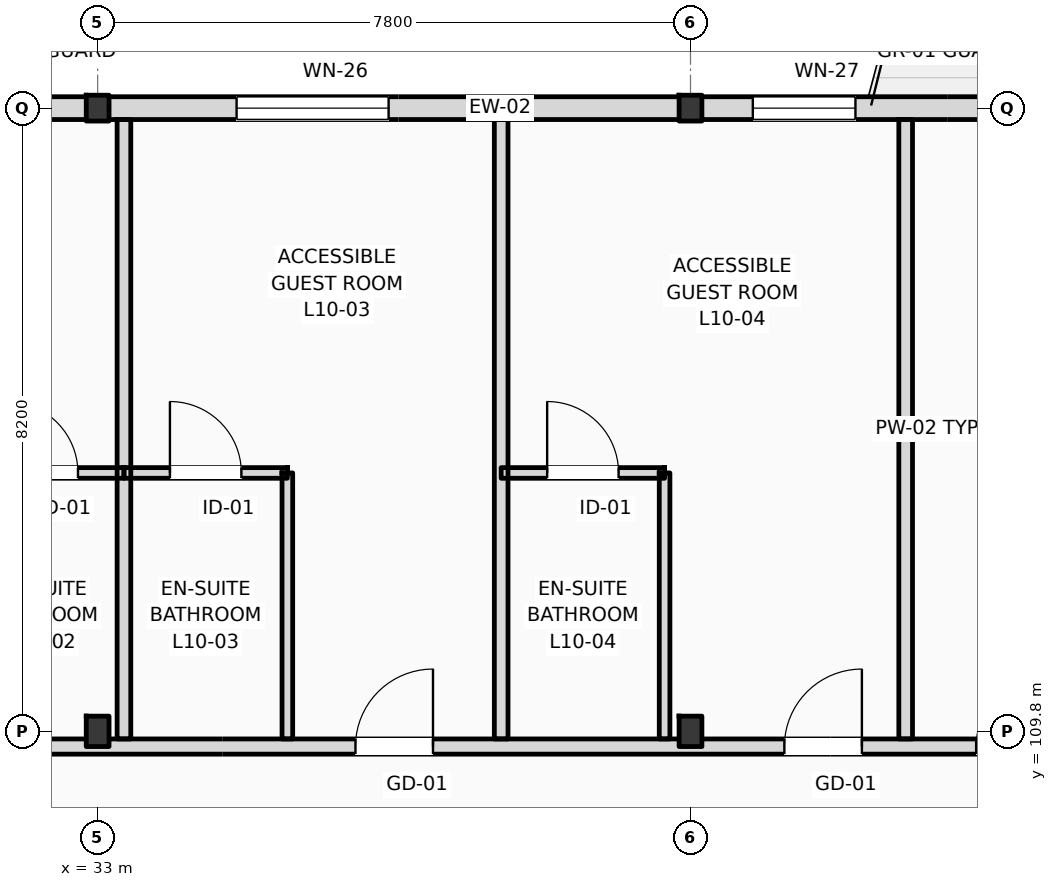
"""IFC4 building model, lengths in metres.
Left out: names, types, materials, properties, quantities, classifications, styles, units other than length and angle.
Written with IfcOpenShell. Run it as: python <this file> out.ifc"""

import sys

from ifc_helpers import new_model, si_unit, direction, frame, frame_2d, origin, origin_2d, place, context, subcontext, project, spatial, rectangle, i_section, extrude, element, fill, save


model = new_model("IFC4")
c1 = context("Model", 3, precision=1e-05, world=origin(), true_north=direction((0.0, 1.0)))
c2 = subcontext(c1, "Body", "Model", "MODEL_VIEW")
j1 = project(units=[si_unit("LENGTHUNIT", "METRE"), si_unit("PLANEANGLEUNIT", "RADIAN")], contexts=[c1])
p1 = place(None, origin())
s1 = spatial("IfcSite", under=j1, at=p1, CompositionType="ELEMENT")
p2 = place(p1, origin())
s2 = spatial("IfcBuilding", under=s1, at=p2, CompositionType="ELEMENT")
p3 = place(p2, frame((0.0, 0.0, 42.6)))
s3 = spatial("IfcBuildingStorey", under=s2, at=p3, CompositionType="ELEMENT", Elevation=42.6)
p4 = place(p3, frame((33.0, 109.8, 0.0), z_axis=(0.0, 0.0, 1.0), x_axis=(1.0, 0.0, 0.0)))
e1 = element("IfcColumn", 1, at=p4, inside=s3, PredefinedType="COLUMN", context=c2, shape_type="SweptSolid", body=[
    extrude(i_section(OverallWidth=0.3, OverallDepth=0.4, WebThickness=0.013, FlangeThickness=0.024, FilletRadius=0.027, at=origin_2d()), origin(), (0.0, 0.0, 1.0), 4.2),
])
p5 = place(p3, frame((33.0, 118.0, 0.0), z_axis=(0.0, 0.0, 1.0), x_axis=(1.0, 0.0, 0.0)))
e2 = element("IfcColumn", 2, at=p5, inside=s3, PredefinedType="COLUMN", context=c2, shape_type="SweptSolid", body=[
    extrude(i_section(OverallWidth=0.3, OverallDepth=0.34, WebThickness=0.012, FlangeThickness=0.021, FilletRadius=0.027, at=origin_2d()), origin(), (0.0, 0.0, 1.0), 4.2),
])
p6 = place(p3, frame((40.8, 109.8, 0.0), z_axis=(0.0, 0.0, 1.0), x_axis=(1.0, 0.0, 0.0)))
e3 = element("IfcColumn", 3, at=p6, inside=s3, PredefinedType="COLUMN", context=c2, shape_type="SweptSolid", body=[
    extrude(i_section(OverallWidth=0.3, OverallDepth=0.4, WebThickness=0.013, FlangeThickness=0.024, FilletRadius=0.027, at=origin_2d()), origin(), (0.0, 0.0, 1.0), 4.2),
])
p7 = place(p3, frame((40.8, 118.0, 0.0), z_axis=(0.0, 0.0, 1.0), x_axis=(1.0, 0.0, 0.0)))
e4 = element("IfcColumn", 4, at=p7, inside=s3, PredefinedType="COLUMN", context=c2, shape_type="SweptSolid", body=[
    extrude(i_section(OverallWidth=0.3, OverallDepth=0.34, WebThickness=0.012, FlangeThickness=0.021, FilletRadius=0.027, at=origin_2d()), origin(), (0.0, 0.0, 1.0), 4.2),
])
p8 = place(p3, frame((22.5, 118.0, 0.0), z_axis=(0.0, 0.0, 1.0), x_axis=(1.0, 0.0, 0.0)))
e5 = element("IfcWall", 5, at=p8, inside=s3, PredefinedType="STANDARD", context=c2, shape_type="SweptSolid", body=[
    extrude(rectangle(XDim=72.9, YDim=0.3, at=frame_2d((36.45, 0.0))), origin(), (0.0, 0.0, 1.0), 3.42),
])
p9 = place(p8, frame((3.611, 0.0, 0.9)))
e6 = element("IfcOpeningElement", 6, at=p9, cuts=e5, PredefinedType="OPENING", context=c2, shape_type="SweptSolid", body=[
    extrude(rectangle(XDim=1.35, YDim=1.75, at=frame_2d((0.675, 0.875))), frame((0.0, 0.16, 0.0), z_axis=(0.0, -1.0, 0.0), x_axis=(1.0, 0.0, 0.0)), (0.0, 0.0, 1.0), 0.32),
])
p10 = place(p8, frame((7.091, 0.0, 0.0)))
e7 = element("IfcOpeningElement", 7, at=p10, cuts=e5, PredefinedType="OPENING", context=c2, shape_type="SweptSolid", body=[
    extrude(rectangle(XDim=1.2, YDim=2.25, at=frame_2d((0.6, 1.125))), frame((0.0, 0.16, 0.0), z_axis=(0.0, -1.0, 0.0), x_axis=(1.0, 0.0, 0.0)), (0.0, 0.0, 1.0), 0.32),
])
p11 = place(p8, frame((12.328, 0.0, 0.9)))
e8 = element("IfcOpeningElement", 8, at=p11, cuts=e5, PredefinedType="OPENING", context=c2, shape_type="SweptSolid", body=[
    extrude(rectangle(XDim=2.0, YDim=2.34, at=frame_2d((1.0, 1.17))), frame((0.0, 0.16, 0.0), z_axis=(0.0, -1.0, 0.0), x_axis=(1.0, 0.0, 0.0)), (0.0, 0.0, 1.0), 0.32),
])
p12 = place(p8, frame((19.12, 0.0, 0.9)))
e9 = element("IfcOpeningElement", 9, at=p12, cuts=e5, PredefinedType="OPENING", context=c2, shape_type="SweptSolid", body=[
    extrude(rectangle(XDim=1.35, YDim=2.34, at=frame_2d((0.675, 1.17))), frame((0.0, 0.16, 0.0), z_axis=(0.0, -1.0, 0.0), x_axis=(1.0, 0.0, 0.0)), (0.0, 0.0, 1.0), 0.32),
])
p13 = place(p8, frame((22.696, 0.0, 0.0)))
e10 = element("IfcOpeningElement", 10, at=p13, cuts=e5, PredefinedType="OPENING", context=c2, shape_type="SweptSolid", body=[
    extrude(rectangle(XDim=1.2, YDim=2.25, at=frame_2d((0.6, 1.125))), frame((0.0, 0.16, 0.0), z_axis=(0.0, -1.0, 0.0), x_axis=(1.0, 0.0, 0.0)), (0.0, 0.0, 1.0), 0.32),
])
p14 = place(p8, frame((27.205, 0.0, 0.9)))
e11 = element("IfcOpeningElement", 11, at=p14, cuts=e5, PredefinedType="OPENING", context=c2, shape_type="SweptSolid", body=[
    extrude(rectangle(XDim=3.1, YDim=2.34, at=frame_2d((1.55, 1.17))), frame((0.0, 0.16, 0.0), z_axis=(0.0, -1.0, 0.0), x_axis=(1.0, 0.0, 0.0)), (0.0, 0.0, 1.0), 0.32),
])
p15 = place(p8, frame((31.948, 0.0, 0.9)))
e12 = element("IfcOpeningElement", 12, at=p15, cuts=e5, PredefinedType="OPENING", context=c2, shape_type="SweptSolid", body=[
    extrude(rectangle(XDim=1.1, YDim=2.34, at=frame_2d((0.55, 1.17))), frame((0.0, 0.16, 0.0), z_axis=(0.0, -1.0, 0.0), x_axis=(1.0, 0.0, 0.0)), (0.0, 0.0, 1.0), 0.32),
])
p16 = place(p8, frame((38.12, 0.0, 0.0)))
e13 = element("IfcOpeningElement", 13, at=p16, cuts=e5, PredefinedType="OPENING", context=c2, shape_type="SweptSolid", body=[
    extrude(rectangle(XDim=1.2, YDim=2.25, at=frame_2d((0.6, 1.125))), frame((0.0, 0.16, 0.0), z_axis=(0.0, -1.0, 0.0), x_axis=(1.0, 0.0, 0.0)), (0.0, 0.0, 1.0), 0.32),
])
p17 = place(p8, frame((43.51, 0.0, 0.9)))
e14 = element("IfcOpeningElement", 14, at=p17, cuts=e5, PredefinedType="OPENING", context=c2, shape_type="SweptSolid", body=[
    extrude(rectangle(XDim=1.35, YDim=1.85, at=frame_2d((0.675, 0.925))), frame((0.0, 0.16, 0.0), z_axis=(0.0, -1.0, 0.0), x_axis=(1.0, 0.0, 0.0)), (0.0, 0.0, 1.0), 0.32),
])
p18 = place(p8, frame((47.178, 0.0, 0.9)))
e15 = element("IfcOpeningElement", 15, at=p18, cuts=e5, PredefinedType="OPENING", context=c2, shape_type="SweptSolid", body=[
    extrude(rectangle(XDim=1.5, YDim=1.9, at=frame_2d((0.75, 0.95))), frame((0.0, 0.16, 0.0), z_axis=(0.0, -1.0, 0.0), x_axis=(1.0, 0.0, 0.0)), (0.0, 0.0, 1.0), 0.32),
])
p19 = place(p8, frame((53.724, 0.0, 0.0)))
e16 = element("IfcOpeningElement", 16, at=p19, cuts=e5, PredefinedType="OPENING", context=c2, shape_type="SweptSolid", body=[
    extrude(rectangle(XDim=1.2, YDim=2.25, at=frame_2d((0.6, 1.125))), frame((0.0, 0.16, 0.0), z_axis=(0.0, -1.0, 0.0), x_axis=(1.0, 0.0, 0.0)), (0.0, 0.0, 1.0), 0.32),
])
p20 = place(p8, frame((58.712, 0.0, 0.9)))
e17 = element("IfcOpeningElement", 17, at=p20, cuts=e5, PredefinedType="OPENING", context=c2, shape_type="SweptSolid", body=[
    extrude(rectangle(XDim=1.8, YDim=2.0, at=frame_2d((0.9, 1.0))), frame((0.0, 0.16, 0.0), z_axis=(0.0, -1.0, 0.0), x_axis=(1.0, 0.0, 0.0)), (0.0, 0.0, 1.0), 0.32),
])
p21 = place(p8, frame((62.781, 0.0, 0.9)))
e18 = element("IfcOpeningElement", 18, at=p21, cuts=e5, PredefinedType="OPENING", context=c2, shape_type="SweptSolid", body=[
    extrude(rectangle(XDim=1.35, YDim=2.05, at=frame_2d((0.675, 1.025))), frame((0.0, 0.16, 0.0), z_axis=(0.0, -1.0, 0.0), x_axis=(1.0, 0.0, 0.0)), (0.0, 0.0, 1.0), 0.32),
])
p22 = place(p8, frame((68.819, 0.0, 0.9)))
e19 = element("IfcOpeningElement", 19, at=p22, cuts=e5, PredefinedType="OPENING", context=c2, shape_type="SweptSolid", body=[
    extrude(rectangle(XDim=2.1, YDim=2.1, at=frame_2d((1.05, 1.05))), frame((0.0, 0.16, 0.0), z_axis=(0.0, -1.0, 0.0), x_axis=(1.0, 0.0, 0.0)), (0.0, 0.0, 1.0), 0.32),
])
p23 = place(p3, frame((10.65, 109.6, 0.0), z_axis=(0.0, 0.0, 1.0), x_axis=(1.0, 0.0, 0.0)))
e20 = element("IfcWall", 20, at=p23, inside=s3, PredefinedType="PARTITIONING", context=c2, shape_type="SweptSolid", body=[
    extrude(rectangle(XDim=84.61, YDim=0.2, at=frame_2d((42.305, 0.0))), origin(), (0.0, 0.0, 1.0), 3.38),
])
p24 = place(p23, frame((15.926, 0.0, 0.0)))
e21 = element("IfcOpeningElement", 21, at=p24, cuts=e20, PredefinedType="OPENING", context=c2, shape_type="SweptSolid", body=[
    extrude(rectangle(XDim=1.02, YDim=2.2, at=frame_2d((0.51, 1.1))), frame((0.0, 0.11, 0.0), z_axis=(0.0, -1.0, 0.0), x_axis=(1.0, 0.0, 0.0)), (0.0, 0.0, 1.0), 0.22),
])
p25 = place(p23, frame((18.45, 0.0, 0.0)))
e22 = element("IfcOpeningElement", 22, at=p25, cuts=e20, PredefinedType="OPENING", context=c2, shape_type="SweptSolid", body=[
    extrude(rectangle(XDim=1.02, YDim=2.2, at=frame_2d((0.51, 1.1))), frame((0.0, 0.11, 0.0), z_axis=(0.0, -1.0, 0.0), x_axis=(1.0, 0.0, 0.0)), (0.0, 0.0, 1.0), 0.22),
])
p26 = place(p23, frame((25.742, 0.0, 0.0)))
e23 = element("IfcOpeningElement", 23, at=p26, cuts=e20, PredefinedType="OPENING", context=c2, shape_type="SweptSolid", body=[
    extrude(rectangle(XDim=1.02, YDim=2.2, at=frame_2d((0.51, 1.1))), frame((0.0, 0.11, 0.0), z_axis=(0.0, -1.0, 0.0), x_axis=(1.0, 0.0, 0.0)), (0.0, 0.0, 1.0), 0.22),
])
p27 = place(p23, frame((31.385, 0.0, 0.0)))
e24 = element("IfcOpeningElement", 24, at=p27, cuts=e20, PredefinedType="OPENING", context=c2, shape_type="SweptSolid", body=[
    extrude(rectangle(XDim=1.02, YDim=2.2, at=frame_2d((0.51, 1.1))), frame((0.0, 0.11, 0.0), z_axis=(0.0, -1.0, 0.0), x_axis=(1.0, 0.0, 0.0)), (0.0, 0.0, 1.0), 0.22),
])
p28 = place(p23, frame((33.908, 0.0, 0.0)))
e25 = element("IfcOpeningElement", 25, at=p28, cuts=e20, PredefinedType="OPENING", context=c2, shape_type="SweptSolid", body=[
    extrude(rectangle(XDim=0.96, YDim=2.2, at=frame_2d((0.48, 1.1))), frame((0.0, 0.11, 0.0), z_axis=(0.0, -1.0, 0.0), x_axis=(1.0, 0.0, 0.0)), (0.0, 0.0, 1.0), 0.22),
])
p29 = place(p23, frame((41.201, 0.0, 0.0)))
e26 = element("IfcOpeningElement", 26, at=p29, cuts=e20, PredefinedType="OPENING", context=c2, shape_type="SweptSolid", body=[
    extrude(rectangle(XDim=0.96, YDim=2.2, at=frame_2d((0.48, 1.1))), frame((0.0, 0.11, 0.0), z_axis=(0.0, -1.0, 0.0), x_axis=(1.0, 0.0, 0.0)), (0.0, 0.0, 1.0), 0.22),
])
p30 = place(p23, frame((46.844, 0.0, 0.0)))
e27 = element("IfcOpeningElement", 27, at=p30, cuts=e20, PredefinedType="OPENING", context=c2, shape_type="SweptSolid", body=[
    extrude(rectangle(XDim=0.96, YDim=2.2, at=frame_2d((0.48, 1.1))), frame((0.0, 0.11, 0.0), z_axis=(0.0, -1.0, 0.0), x_axis=(1.0, 0.0, 0.0)), (0.0, 0.0, 1.0), 0.22),
])
p31 = place(p23, frame((49.337, 0.0, 0.0)))
e28 = element("IfcOpeningElement", 28, at=p31, cuts=e20, PredefinedType="OPENING", context=c2, shape_type="SweptSolid", body=[
    extrude(rectangle(XDim=0.96, YDim=2.2, at=frame_2d((0.48, 1.1))), frame((0.0, 0.11, 0.0), z_axis=(0.0, -1.0, 0.0), x_axis=(1.0, 0.0, 0.0)), (0.0, 0.0, 1.0), 0.22),
])
p32 = place(p23, frame((56.63, 0.0, 0.0)))
e29 = element("IfcOpeningElement", 29, at=p32, cuts=e20, PredefinedType="OPENING", context=c2, shape_type="SweptSolid", body=[
    extrude(rectangle(XDim=0.96, YDim=2.2, at=frame_2d((0.48, 1.1))), frame((0.0, 0.11, 0.0), z_axis=(0.0, -1.0, 0.0), x_axis=(1.0, 0.0, 0.0)), (0.0, 0.0, 1.0), 0.22),
])
p33 = place(p23, frame((62.523, 0.0, 0.0)))
e30 = element("IfcOpeningElement", 30, at=p33, cuts=e20, PredefinedType="OPENING", context=c2, shape_type="SweptSolid", body=[
    extrude(rectangle(XDim=0.96, YDim=2.2, at=frame_2d((0.48, 1.1))), frame((0.0, 0.11, 0.0), z_axis=(0.0, -1.0, 0.0), x_axis=(1.0, 0.0, 0.0)), (0.0, 0.0, 1.0), 0.22),
])
p34 = place(p23, frame((64.765, 0.0, 0.0)))
e31 = element("IfcOpeningElement", 31, at=p34, cuts=e20, PredefinedType="OPENING", context=c2, shape_type="SweptSolid", body=[
    extrude(rectangle(XDim=0.96, YDim=2.2, at=frame_2d((0.48, 1.1))), frame((0.0, 0.11, 0.0), z_axis=(0.0, -1.0, 0.0), x_axis=(1.0, 0.0, 0.0)), (0.0, 0.0, 1.0), 0.22),
])
p35 = place(p23, frame((72.057, 0.0, 0.0)))
e32 = element("IfcOpeningElement", 32, at=p35, cuts=e20, PredefinedType="OPENING", context=c2, shape_type="SweptSolid", body=[
    extrude(rectangle(XDim=0.96, YDim=2.2, at=frame_2d((0.48, 1.1))), frame((0.0, 0.11, 0.0), z_axis=(0.0, -1.0, 0.0), x_axis=(1.0, 0.0, 0.0)), (0.0, 0.0, 1.0), 0.22),
])
p36 = place(p23, frame((74.55, 0.0, 0.0)))
e33 = element("IfcOpeningElement", 33, at=p36, cuts=e20, PredefinedType="OPENING", context=c2, shape_type="SweptSolid", body=[
    extrude(rectangle(XDim=0.96, YDim=2.2, at=frame_2d((0.48, 1.1))), frame((0.0, 0.11, 0.0), z_axis=(0.0, -1.0, 0.0), x_axis=(1.0, 0.0, 0.0)), (0.0, 0.0, 1.0), 0.22),
])
p37 = place(p23, frame((80.163, 0.0, 0.0)))
e34 = element("IfcOpeningElement", 34, at=p37, cuts=e20, PredefinedType="OPENING", context=c2, shape_type="SweptSolid", body=[
    extrude(rectangle(XDim=0.96, YDim=2.2, at=frame_2d((0.48, 1.1))), frame((0.0, 0.11, 0.0), z_axis=(0.0, -1.0, 0.0), x_axis=(1.0, 0.0, 0.0)), (0.0, 0.0, 1.0), 0.22),
])
p38 = place(p23, frame((2.716, 0.0, 0.0)))
e35 = element("IfcOpeningElement", 35, at=p38, cuts=e20, PredefinedType="OPENING", context=c2, shape_type="SweptSolid", body=[
    extrude(rectangle(XDim=1.35, YDim=2.25, at=frame_2d((0.675, 1.125))), frame((0.0, 0.11, 0.0), z_axis=(0.0, -1.0, 0.0), x_axis=(1.0, 0.0, 0.0)), (0.0, 0.0, 1.0), 0.22),
])
p39 = place(p23, frame((6.65, 0.0, 0.0)))
e36 = element("IfcOpeningElement", 36, at=p39, cuts=e20, PredefinedType="OPENING", context=c2, shape_type="SweptSolid", body=[
    extrude(rectangle(XDim=1.35, YDim=2.25, at=frame_2d((0.675, 1.125))), frame((0.0, 0.11, 0.0), z_axis=(0.0, -1.0, 0.0), x_axis=(1.0, 0.0, 0.0)), (0.0, 0.0, 1.0), 0.22),
])
p40 = place(p23, frame((10.583, 0.0, 0.0)))
e37 = element("IfcOpeningElement", 37, at=p40, cuts=e20, PredefinedType="OPENING", context=c2, shape_type="SweptSolid", body=[
    extrude(rectangle(XDim=1.35, YDim=2.25, at=frame_2d((0.675, 1.125))), frame((0.0, 0.11, 0.0), z_axis=(0.0, -1.0, 0.0), x_axis=(1.0, 0.0, 0.0)), (0.0, 0.0, 1.0), 0.22),
])
p41 = place(p3, frame((33.346, 109.7, 0.0), z_axis=(0.0, 0.0, 1.0), x_axis=(0.0, 1.0, 0.0)))
e38 = element("IfcWall", 38, at=p41, inside=s3, PredefinedType="PARTITIONING", context=c2, shape_type="SweptSolid", body=[
    extrude(rectangle(XDim=8.15, YDim=0.18, at=frame_2d((4.075, 0.0))), origin(), (0.0, 0.0, 1.0), 3.94),
])
p42 = place(p3, frame((31.196, 113.2, 0.0), z_axis=(0.0, 0.0, 1.0), x_axis=(1.0, 0.0, 0.0)))
e39 = element("IfcWall", 39, at=p42, inside=s3, PredefinedType="PARTITIONING", context=c2, shape_type="SweptSolid", body=[
    extrude(rectangle(XDim=2.15, YDim=0.14, at=frame_2d((1.075, 0.0))), origin(), (0.0, 0.0, 1.0), 3.94),
])
p43 = place(p42, frame((0.605, 0.0, 0.0)))
e40 = element("IfcOpeningElement", 40, at=p43, cuts=e39, PredefinedType="OPENING", context=c2, shape_type="SweptSolid", body=[
    extrude(rectangle(XDim=0.94, YDim=2.15, at=frame_2d((0.47, 1.075))), frame((0.0, 0.08, 0.0), z_axis=(0.0, -1.0, 0.0), x_axis=(1.0, 0.0, 0.0)), (0.0, 0.0, 1.0), 0.16),
])
p44 = place(p3, frame((38.309, 109.7, 0.0), z_axis=(0.0, 0.0, 1.0), x_axis=(0.0, 1.0, 0.0)))
e41 = element("IfcWall", 41, at=p44, inside=s3, PredefinedType="PARTITIONING", context=c2, shape_type="SweptSolid", body=[
    extrude(rectangle(XDim=8.15, YDim=0.18, at=frame_2d((4.075, 0.0))), origin(), (0.0, 0.0, 1.0), 3.63),
])
p45 = place(p3, frame((35.496, 109.7, 0.0), z_axis=(0.0, 0.0, 1.0), x_axis=(0.0, 1.0, 0.0)))
e42 = element("IfcWall", 42, at=p45, inside=s3, PredefinedType="PARTITIONING", context=c2, shape_type="SweptSolid", body=[
    extrude(rectangle(XDim=3.5, YDim=0.14, at=frame_2d((1.75, 0.0))), origin(), (0.0, 0.0, 1.0), 3.63),
])
p46 = place(p3, frame((33.346, 113.2, 0.0), z_axis=(0.0, 0.0, 1.0), x_axis=(1.0, 0.0, 0.0)))
e43 = element("IfcWall", 43, at=p46, inside=s3, PredefinedType="PARTITIONING", context=c2, shape_type="SweptSolid", body=[
    extrude(rectangle(XDim=2.15, YDim=0.14, at=frame_2d((1.075, 0.0))), origin(), (0.0, 0.0, 1.0), 3.94),
])
p47 = place(p46, frame((0.605, 0.0, 0.0)))
e44 = element("IfcOpeningElement", 44, at=p47, cuts=e43, PredefinedType="OPENING", context=c2, shape_type="SweptSolid", body=[
    extrude(rectangle(XDim=0.94, YDim=2.15, at=frame_2d((0.47, 1.075))), frame((0.0, 0.08, 0.0), z_axis=(0.0, -1.0, 0.0), x_axis=(1.0, 0.0, 0.0)), (0.0, 0.0, 1.0), 0.16),
])
p48 = place(p3, frame((43.631, 109.7, 0.0), z_axis=(0.0, 0.0, 1.0), x_axis=(0.0, 1.0, 0.0)))
e45 = element("IfcWall", 45, at=p48, inside=s3, PredefinedType="PARTITIONING", context=c2, shape_type="SweptSolid", body=[
    extrude(rectangle(XDim=8.15, YDim=0.18, at=frame_2d((4.075, 0.0))), origin(), (0.0, 0.0, 1.0), 3.63),
])
p49 = place(p3, frame((40.459, 109.7, 0.0), z_axis=(0.0, 0.0, 1.0), x_axis=(0.0, 1.0, 0.0)))
e46 = element("IfcWall", 46, at=p49, inside=s3, PredefinedType="PARTITIONING", context=c2, shape_type="SweptSolid", body=[
    extrude(rectangle(XDim=3.5, YDim=0.14, at=frame_2d((1.75, 0.0))), origin(), (0.0, 0.0, 1.0), 3.94),
])
p50 = place(p3, frame((38.309, 113.2, 0.0), z_axis=(0.0, 0.0, 1.0), x_axis=(1.0, 0.0, 0.0)))
e47 = element("IfcWall", 47, at=p50, inside=s3, PredefinedType="PARTITIONING", context=c2, shape_type="SweptSolid", body=[
    extrude(rectangle(XDim=2.15, YDim=0.14, at=frame_2d((1.075, 0.0))), origin(), (0.0, 0.0, 1.0), 3.94),
])
p51 = place(p50, frame((0.605, 0.0, 0.0)))
e48 = element("IfcOpeningElement", 48, at=p51, cuts=e47, PredefinedType="OPENING", context=c2, shape_type="SweptSolid", body=[
    extrude(rectangle(XDim=0.94, YDim=2.15, at=frame_2d((0.47, 1.075))), frame((0.0, 0.08, 0.0), z_axis=(0.0, -1.0, 0.0), x_axis=(1.0, 0.0, 0.0)), (0.0, 0.0, 1.0), 0.16),
])
p52 = place(p11, origin())
e49 = element("IfcWindow", 49, at=p52, inside=s3, PartitioningType="DOUBLE_PANEL_VERTICAL", PredefinedType="WINDOW", context=c2, shape_type="SweptSolid", body=[
    extrude(rectangle(XDim=2.0, YDim=2.34, at=frame_2d((1.0, 1.17))), frame((0.0, 0.03, 0.0), z_axis=(0.0, -1.0, 0.0), x_axis=(1.0, 0.0, 0.0)), (0.0, 0.0, 1.0), 0.06),
])
fill(e8, e49)
p53 = place(p12, origin())
e50 = element("IfcWindow", 50, at=p53, inside=s3, PartitioningType="DOUBLE_PANEL_VERTICAL", PredefinedType="WINDOW", context=c2, shape_type="SweptSolid", body=[
    extrude(rectangle(XDim=1.35, YDim=2.34, at=frame_2d((0.675, 1.17))), frame((0.0, 0.03, 0.0), z_axis=(0.0, -1.0, 0.0), x_axis=(1.0, 0.0, 0.0)), (0.0, 0.0, 1.0), 0.06),
])
fill(e9, e50)
p54 = place(p43, origin())
e51 = element("IfcDoor", 51, at=p54, inside=s3, OperationType="SINGLE_SWING_LEFT", PredefinedType="DOOR", context=c2, shape_type="SweptSolid", body=[
    extrude(rectangle(XDim=0.94, YDim=2.15, at=frame_2d((0.47, 1.075))), frame((0.0, 0.025, 0.0), z_axis=(0.0, -1.0, 0.0), x_axis=(1.0, 0.0, 0.0)), (0.0, 0.0, 1.0), 0.05),
])
fill(e40, e51)
p55 = place(p26, origin())
e52 = element("IfcDoor", 52, at=p55, inside=s3, OperationType="SINGLE_SWING_RIGHT", PredefinedType="DOOR", context=c2, shape_type="SweptSolid", body=[
    extrude(rectangle(XDim=1.02, YDim=2.2, at=frame_2d((0.51, 1.1))), frame((0.0, 0.025, 0.0), z_axis=(0.0, -1.0, 0.0), x_axis=(1.0, 0.0, 0.0)), (0.0, 0.0, 1.0), 0.05),
])
fill(e23, e52)
p56 = place(p47, origin())
e53 = element("IfcDoor", 53, at=p56, inside=s3, OperationType="SINGLE_SWING_LEFT", PredefinedType="DOOR", context=c2, shape_type="SweptSolid", body=[
    extrude(rectangle(XDim=0.94, YDim=2.15, at=frame_2d((0.47, 1.075))), frame((0.0, 0.025, 0.0), z_axis=(0.0, -1.0, 0.0), x_axis=(1.0, 0.0, 0.0)), (0.0, 0.0, 1.0), 0.05),
])
fill(e44, e53)
p57 = place(p27, origin())
e54 = element("IfcDoor", 54, at=p57, inside=s3, OperationType="SINGLE_SWING_RIGHT", PredefinedType="DOOR", context=c2, shape_type="SweptSolid", body=[
    extrude(rectangle(XDim=1.02, YDim=2.2, at=frame_2d((0.51, 1.1))), frame((0.0, 0.025, 0.0), z_axis=(0.0, -1.0, 0.0), x_axis=(1.0, 0.0, 0.0)), (0.0, 0.0, 1.0), 0.05),
])
fill(e24, e54)
p58 = place(p51, origin())
e55 = element("IfcDoor", 55, at=p58, inside=s3, OperationType="SINGLE_SWING_LEFT", PredefinedType="DOOR", context=c2, shape_type="SweptSolid", body=[
    extrude(rectangle(XDim=0.94, YDim=2.15, at=frame_2d((0.47, 1.075))), frame((0.0, 0.025, 0.0), z_axis=(0.0, -1.0, 0.0), x_axis=(1.0, 0.0, 0.0)), (0.0, 0.0, 1.0), 0.05),
])
fill(e48, e55)
p59 = place(p28, origin())
e56 = element("IfcDoor", 56, at=p59, inside=s3, OperationType="SINGLE_SWING_RIGHT", PredefinedType="DOOR", context=c2, shape_type="SweptSolid", body=[
    extrude(rectangle(XDim=0.96, YDim=2.2, at=frame_2d((0.48, 1.1))), frame((0.0, 0.025, 0.0), z_axis=(0.0, -1.0, 0.0), x_axis=(1.0, 0.0, 0.0)), (0.0, 0.0, 1.0), 0.05),
])
fill(e25, e56)
save(model, sys.argv[1])
